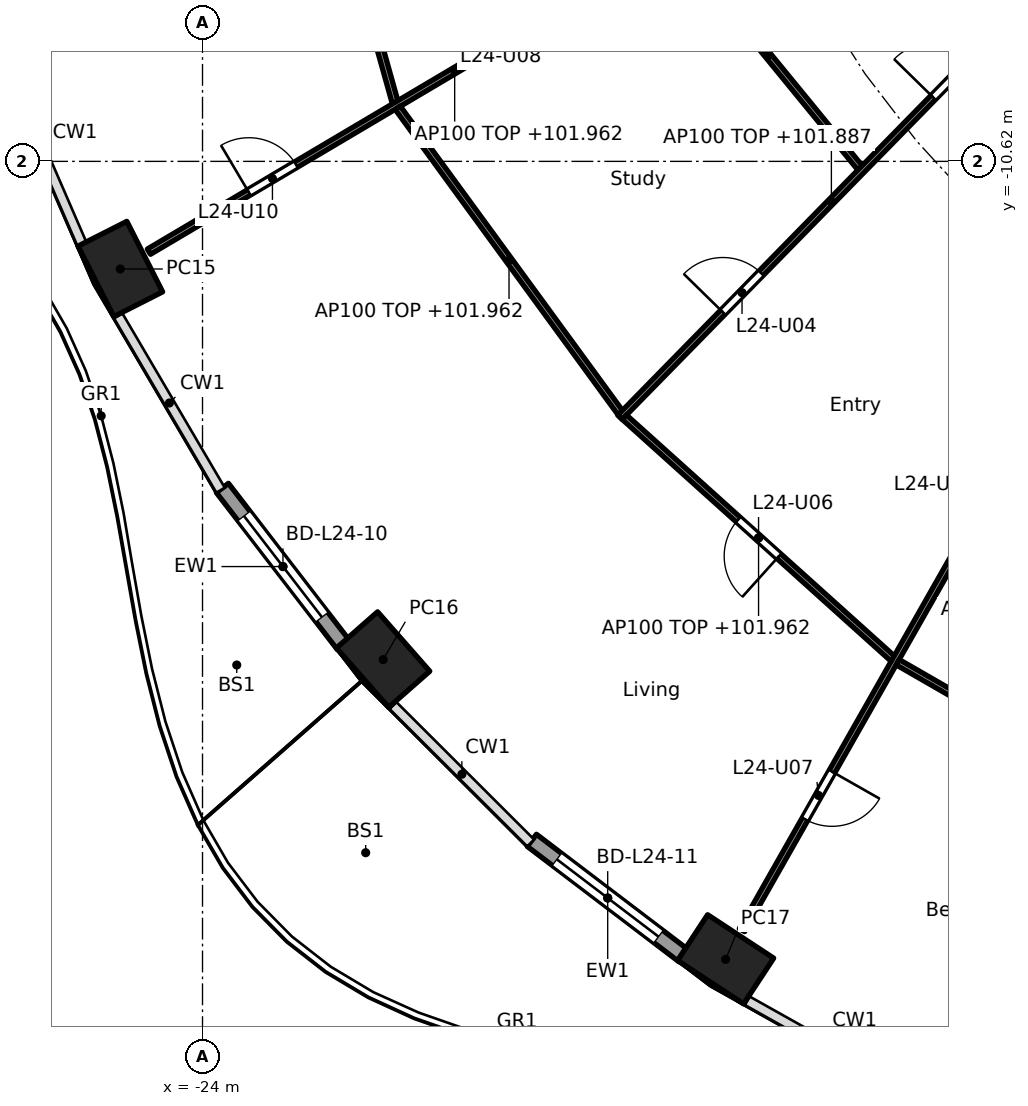
"""IFC4 building model, lengths in metres.
Left out: names, types, materials, properties, quantities, classifications, styles, units other than length and angle.
Written with IfcOpenShell. Run it as: python <this file> out.ifc"""

import sys

from ifc_helpers import new_model, si_unit, direction, frame, frame_2d, origin, origin_2d, place, context, subcontext, project, spatial, rectangle, hollow_rectangle, extrude, element, fill, save


model = new_model("IFC4")
c1 = context("Model", 3, precision=1e-05, world=origin(), true_north=direction((0.0, 1.0)))
c2 = subcontext(c1, "Body", "Model", "MODEL_VIEW")
j1 = project(units=[si_unit("LENGTHUNIT", "METRE"), si_unit("PLANEANGLEUNIT", "RADIAN")], contexts=[c1])
p1 = place(None, origin())
s1 = spatial("IfcSite", under=j1, at=p1, CompositionType="ELEMENT")
p2 = place(p1, origin())
s2 = spatial("IfcBuilding", under=s1, at=p2, CompositionType="ELEMENT")
p3 = place(p2, frame((0.0, 0.0, 99.2)))
s3 = spatial("IfcBuildingStorey", under=s2, at=p3, CompositionType="ELEMENT", Elevation=99.2)
for number, where, z_axis, x_axis in (
    (1, (-25.352, -12.39, 0.0), (0.0, 0.0, 1.0), (0.452, -0.892, 0.0)),
    (2, (-21.03, -18.813, 0.0), (0.0, 0.0, 1.0), (0.66, -0.751, 0.0)),
    (3, (-15.397, -23.742, 0.0), (0.0, 0.0, 1.0), (0.836, -0.549, 0.0)),
):
    element("IfcColumn", number, at=place(p3, frame(where, z_axis=z_axis, x_axis=x_axis)), inside=s3, PredefinedType="COLUMN", context=c2, shape_type="SweptSolid", body=[
        extrude(hollow_rectangle(XDim=1.3, YDim=0.9, WallThickness=0.045, at=origin_2d()), origin(), (0.0, 0.0, 1.0), 3.7),
    ])
p4 = place(p3, frame((-21.681, -18.576, 0.0), z_axis=(0.0, 0.0, 1.0), x_axis=(-0.61041202934, 0.792084057684, 0.0)))
e4 = element("IfcWall", 4, at=p4, inside=s3, PredefinedType="SOLIDWALL", context=c2, shape_type="SweptSolid", body=[
    extrude(rectangle(XDim=3.263, YDim=0.25, at=frame_2d((1.631, 0.0))), origin(), (0.0, 0.0, 1.0), 3.44),
])
p5 = place(p4, frame((0.582, 0.0, 0.0)))
e5 = element("IfcOpeningElement", 5, at=p5, cuts=e4, PredefinedType="OPENING", context=c2, shape_type="SweptSolid", body=[
    extrude(rectangle(XDim=2.1, YDim=2.4, at=frame_2d((1.05, 1.2))), frame((0.0, 0.135, 0.0), z_axis=(0.0, -1.0, 0.0), x_axis=(1.0, 0.0, 0.0)), (0.0, 0.0, 1.0), 0.27),
])
p6 = place(p3, frame((-16.089, -23.682, 0.0), z_axis=(0.0, 0.0, 1.0), x_axis=(-0.796037575978, 0.605247203736, 0.0)))
e6 = element("IfcWall", 6, at=p6, inside=s3, PredefinedType="SOLIDWALL", context=c2, shape_type="SweptSolid", body=[
    extrude(rectangle(XDim=3.134, YDim=0.25, at=frame_2d((1.567, 0.0))), origin(), (0.0, 0.0, 1.0), 3.44),
])
p7 = place(p6, frame((0.517, 0.0, 0.0)))
e7 = element("IfcOpeningElement", 7, at=p7, cuts=e6, PredefinedType="OPENING", context=c2, shape_type="SweptSolid", body=[
    extrude(rectangle(XDim=2.1, YDim=2.4, at=frame_2d((1.05, 1.2))), frame((0.0, 0.135, 0.0), z_axis=(0.0, -1.0, 0.0), x_axis=(1.0, 0.0, 0.0)), (0.0, 0.0, 1.0), 0.27),
])
p8 = place(p3, frame((-12.635, -5.134, 0.0), z_axis=(0.0, 0.0, 1.0), x_axis=(0.707106781187, -0.707106781187, 0.0)))
e8 = element("IfcWall", 8, at=p8, inside=s3, PredefinedType="PARTITIONING", context=c2, shape_type="SweptSolid", body=[
    extrude(rectangle(XDim=10.609, YDim=0.2, at=frame_2d((5.305, 0.0))), origin(), (0.0, 0.0, 1.0), 3.44),
])
p9 = place(p8, frame((4.804, 0.0, 0.0)))
e9 = element("IfcOpeningElement", 9, at=p9, cuts=e8, PredefinedType="OPENING", context=c2, shape_type="SweptSolid", body=[
    extrude(rectangle(XDim=1.0, YDim=2.1, at=frame_2d((0.5, 1.05))), frame((0.0, 0.11, 0.0), z_axis=(0.0, -1.0, 0.0), x_axis=(1.0, 0.0, 0.0)), (0.0, 0.0, 1.0), 0.22),
])
p10 = place(p3, frame((-22.463, -3.832, 0.0), z_axis=(0.0, 0.0, 1.0), x_axis=(0.269797759333, -0.962917010473, 0.0)))
e10 = element("IfcWall", 10, at=p10, inside=s3, PredefinedType="PARTITIONING", context=c2, shape_type="SweptSolid", body=[
    extrude(rectangle(XDim=6.043, YDim=0.1, at=frame_2d((3.021, 0.0))), origin(), (0.0, 0.0, 1.0), 2.762),
])
p11 = place(p3, frame((-14.825, -6.148, 0.0), z_axis=(0.0, 0.0, 1.0), x_axis=(-0.860400431487, -0.509618580408, 0.0)))
e11 = element("IfcWall", 11, at=p11, inside=s3, PredefinedType="PARTITIONING", context=c2, shape_type="SweptSolid", body=[
    extrude(rectangle(XDim=11.688, YDim=0.1, at=frame_2d((5.844, 0.0))), origin(), (0.0, 0.0, 1.0), 2.762),
])
p12 = place(p11, frame((3.858, 0.0, 0.0)))
e12 = element("IfcOpeningElement", 12, at=p12, cuts=e11, PredefinedType="OPENING", context=c2, shape_type="SweptSolid", body=[
    extrude(rectangle(XDim=0.9, YDim=2.1, at=frame_2d((0.45, 1.05))), frame((0.0, 0.06, 0.0), z_axis=(0.0, -1.0, 0.0), x_axis=(1.0, 0.0, 0.0)), (0.0, 0.0, 1.0), 0.12),
])
p13 = place(p11, frame((8.877, 0.0, 0.0)))
e13 = element("IfcOpeningElement", 13, at=p13, cuts=e11, PredefinedType="OPENING", context=c2, shape_type="SweptSolid", body=[
    extrude(rectangle(XDim=0.9, YDim=2.1, at=frame_2d((0.45, 1.05))), frame((0.0, 0.06, 0.0), z_axis=(0.0, -1.0, 0.0), x_axis=(1.0, 0.0, 0.0)), (0.0, 0.0, 1.0), 0.12),
])
p14 = place(p3, frame((-16.214, -7.028, 0.0), z_axis=(0.0, 0.0, 1.0), x_axis=(0.633396341139, -0.773827548639, 0.0)))
e14 = element("IfcWall", 14, at=p14, inside=s3, PredefinedType="PARTITIONING", context=c2, shape_type="SweptSolid", body=[
    extrude(rectangle(XDim=4.779, YDim=0.1, at=frame_2d((2.39, 0.0))), origin(), (0.0, 0.0, 1.0), 2.762),
])
p15 = place(p3, frame((-20.79, -9.739, 0.0), z_axis=(0.0, 0.0, 1.0), x_axis=(0.589611246748, -0.807687178126, 0.0)))
e15 = element("IfcWall", 15, at=p15, inside=s3, PredefinedType="PARTITIONING", context=c2, shape_type="SweptSolid", body=[
    extrude(rectangle(XDim=6.208, YDim=0.1, at=frame_2d((3.104, 0.0))), origin(), (0.0, 0.0, 1.0), 2.762),
])
p16 = place(p3, frame((-10.181, -7.729, 0.0), z_axis=(0.0, 0.0, 1.0), x_axis=(-0.699710752188, -0.714426247609, 0.0)))
e16 = element("IfcWall", 16, at=p16, inside=s3, PredefinedType="PARTITIONING", context=c2, shape_type="SweptSolid", body=[
    extrude(rectangle(XDim=9.938, YDim=0.1, at=frame_2d((4.969, 0.0))), origin(), (0.0, 0.0, 1.0), 2.687),
])
p17 = place(p16, frame((1.675, 0.0, 0.0)))
e17 = element("IfcOpeningElement", 17, at=p17, cuts=e16, PredefinedType="OPENING", context=c2, shape_type="SweptSolid", body=[
    extrude(rectangle(XDim=0.9, YDim=2.1, at=frame_2d((0.45, 1.05))), frame((0.0, 0.06, 0.0), z_axis=(0.0, -1.0, 0.0), x_axis=(1.0, 0.0, 0.0)), (0.0, 0.0, 1.0), 0.12),
])
p18 = place(p16, frame((6.619, 0.0, 0.0)))
e18 = element("IfcOpeningElement", 18, at=p18, cuts=e16, PredefinedType="OPENING", context=c2, shape_type="SweptSolid", body=[
    extrude(rectangle(XDim=0.9, YDim=2.1, at=frame_2d((0.45, 1.05))), frame((0.0, 0.06, 0.0), z_axis=(0.0, -1.0, 0.0), x_axis=(1.0, 0.0, 0.0)), (0.0, 0.0, 1.0), 0.12),
])
p19 = place(p3, frame((-17.063, -14.827, 0.0), z_axis=(0.0, 0.0, 1.0), x_axis=(0.743478142868, -0.668760234373, 0.0)))
e19 = element("IfcWall", 19, at=p19, inside=s3, PredefinedType="PARTITIONING", context=c2, shape_type="SweptSolid", body=[
    extrude(rectangle(XDim=5.937, YDim=0.1, at=frame_2d((2.969, 0.0))), origin(), (0.0, 0.0, 1.0), 2.762),
])
p20 = place(p19, frame((2.519, 0.0, 0.0)))
e20 = element("IfcOpeningElement", 20, at=p20, cuts=e19, PredefinedType="OPENING", context=c2, shape_type="SweptSolid", body=[
    extrude(rectangle(XDim=0.9, YDim=2.1, at=frame_2d((0.45, 1.05))), frame((0.0, 0.06, 0.0), z_axis=(0.0, -1.0, 0.0), x_axis=(1.0, 0.0, 0.0)), (0.0, 0.0, 1.0), 0.12),
])
p21 = place(p3, frame((-7.707, -10.198, 0.0), z_axis=(0.0, 0.0, 1.0), x_axis=(-0.49395524734, -0.869487328042, 0.0)))
e21 = element("IfcWall", 21, at=p21, inside=s3, PredefinedType="PARTITIONING", context=c2, shape_type="SweptSolid", body=[
    extrude(rectangle(XDim=15.025, YDim=0.1, at=frame_2d((7.512, 0.0))), origin(), (0.0, 0.0, 1.0), 2.687),
])
p22 = place(p21, frame((1.684, 0.0, 0.0)))
e22 = element("IfcOpeningElement", 22, at=p22, cuts=e21, PredefinedType="OPENING", context=c2, shape_type="SweptSolid", body=[
    extrude(rectangle(XDim=0.9, YDim=2.1, at=frame_2d((0.45, 1.05))), frame((0.0, 0.06, 0.0), z_axis=(0.0, -1.0, 0.0), x_axis=(1.0, 0.0, 0.0)), (0.0, 0.0, 1.0), 0.12),
])
p23 = place(p21, frame((6.648, 0.0, 0.0)))
e23 = element("IfcOpeningElement", 23, at=p23, cuts=e21, PredefinedType="OPENING", context=c2, shape_type="SweptSolid", body=[
    extrude(rectangle(XDim=0.9, YDim=2.1, at=frame_2d((0.45, 1.05))), frame((0.0, 0.06, 0.0), z_axis=(0.0, -1.0, 0.0), x_axis=(1.0, 0.0, 0.0)), (0.0, 0.0, 1.0), 0.12),
])
p24 = place(p21, frame((12.027, 0.0, 0.0)))
e24 = element("IfcOpeningElement", 24, at=p24, cuts=e21, PredefinedType="OPENING", context=c2, shape_type="SweptSolid", body=[
    extrude(rectangle(XDim=0.9, YDim=2.1, at=frame_2d((0.45, 1.05))), frame((0.0, 0.06, 0.0), z_axis=(0.0, -1.0, 0.0), x_axis=(1.0, 0.0, 0.0)), (0.0, 0.0, 1.0), 0.12),
])
p25 = place(p3, frame((-12.568, -18.856, 0.0), z_axis=(0.0, 0.0, 1.0), x_axis=(0.866533437451, -0.499119025664, 0.0)))
e25 = element("IfcWall", 25, at=p25, inside=s3, PredefinedType="PARTITIONING", context=c2, shape_type="SweptSolid", body=[
    extrude(rectangle(XDim=5.535, YDim=0.1, at=frame_2d((2.768, 0.0))), origin(), (0.0, 0.0, 1.0), 2.762),
])
p26 = place(p25, frame((3.714, 0.0, 0.0)))
e26 = element("IfcOpeningElement", 26, at=p26, cuts=e25, PredefinedType="OPENING", context=c2, shape_type="SweptSolid", body=[
    extrude(rectangle(XDim=0.9, YDim=2.1, at=frame_2d((0.45, 1.05))), frame((0.0, 0.06, 0.0), z_axis=(0.0, -1.0, 0.0), x_axis=(1.0, 0.0, 0.0)), (0.0, 0.0, 1.0), 0.12),
])
p27 = place(p5, origin())
e27 = element("IfcDoor", 27, at=p27, inside=s3, OperationType="SLIDING_TO_LEFT", PredefinedType="DOOR", context=c2, shape_type="SweptSolid", body=[
    extrude(rectangle(XDim=2.1, YDim=2.4, at=frame_2d((1.05, 1.2))), frame((0.0, 0.025, 0.0), z_axis=(0.0, -1.0, 0.0), x_axis=(1.0, 0.0, 0.0)), (0.0, 0.0, 1.0), 0.05),
])
fill(e5, e27)
p28 = place(p7, origin())
e28 = element("IfcDoor", 28, at=p28, inside=s3, OperationType="SLIDING_TO_LEFT", PredefinedType="DOOR", context=c2, shape_type="SweptSolid", body=[
    extrude(rectangle(XDim=2.1, YDim=2.4, at=frame_2d((1.05, 1.2))), frame((0.0, 0.025, 0.0), z_axis=(0.0, -1.0, 0.0), x_axis=(1.0, 0.0, 0.0)), (0.0, 0.0, 1.0), 0.05),
])
fill(e7, e28)
p29 = place(p17, frame((0.9, 0.0, 0.0), x_axis=(-1.0, 0.0, 0.0)))
e29 = element("IfcDoor", 29, at=p29, inside=s3, OperationType="SINGLE_SWING_LEFT", PredefinedType="DOOR", context=c2, shape_type="SweptSolid", body=[
    extrude(rectangle(XDim=0.9, YDim=2.1, at=frame_2d((0.45, 1.05))), frame((0.0, 0.025, 0.0), z_axis=(0.0, -1.0, 0.0), x_axis=(1.0, 0.0, 0.0)), (0.0, 0.0, 1.0), 0.05),
])
fill(e17, e29)
p30 = place(p18, frame((0.9, 0.0, 0.0), x_axis=(-1.0, 0.0, 0.0)))
e30 = element("IfcDoor", 30, at=p30, inside=s3, OperationType="SINGLE_SWING_LEFT", PredefinedType="DOOR", context=c2, shape_type="SweptSolid", body=[
    extrude(rectangle(XDim=0.9, YDim=2.1, at=frame_2d((0.45, 1.05))), frame((0.0, 0.025, 0.0), z_axis=(0.0, -1.0, 0.0), x_axis=(1.0, 0.0, 0.0)), (0.0, 0.0, 1.0), 0.05),
])
fill(e18, e30)
p31 = place(p20, frame((0.9, 0.0, 0.0), x_axis=(-1.0, 0.0, 0.0)))
e31 = element("IfcDoor", 31, at=p31, inside=s3, OperationType="SINGLE_SWING_LEFT", PredefinedType="DOOR", context=c2, shape_type="SweptSolid", body=[
    extrude(rectangle(XDim=0.9, YDim=2.1, at=frame_2d((0.45, 1.05))), frame((0.0, 0.025, 0.0), z_axis=(0.0, -1.0, 0.0), x_axis=(1.0, 0.0, 0.0)), (0.0, 0.0, 1.0), 0.05),
])
fill(e20, e31)
p32 = place(p24, origin())
e32 = element("IfcDoor", 32, at=p32, inside=s3, OperationType="SINGLE_SWING_LEFT", PredefinedType="DOOR", context=c2, shape_type="SweptSolid", body=[
    extrude(rectangle(XDim=0.9, YDim=2.1, at=frame_2d((0.45, 1.05))), frame((0.0, 0.025, 0.0), z_axis=(0.0, -1.0, 0.0), x_axis=(1.0, 0.0, 0.0)), (0.0, 0.0, 1.0), 0.05),
])
fill(e24, e32)
p33 = place(p13, frame((0.9, 0.0, 0.0), x_axis=(-1.0, 0.0, 0.0)))
e33 = element("IfcDoor", 33, at=p33, inside=s3, OperationType="SINGLE_SWING_LEFT", PredefinedType="DOOR", context=c2, shape_type="SweptSolid", body=[
    extrude(rectangle(XDim=0.9, YDim=2.1, at=frame_2d((0.45, 1.05))), frame((0.0, 0.025, 0.0), z_axis=(0.0, -1.0, 0.0), x_axis=(1.0, 0.0, 0.0)), (0.0, 0.0, 1.0), 0.05),
])
fill(e13, e33)
save(model, sys.argv[1])
